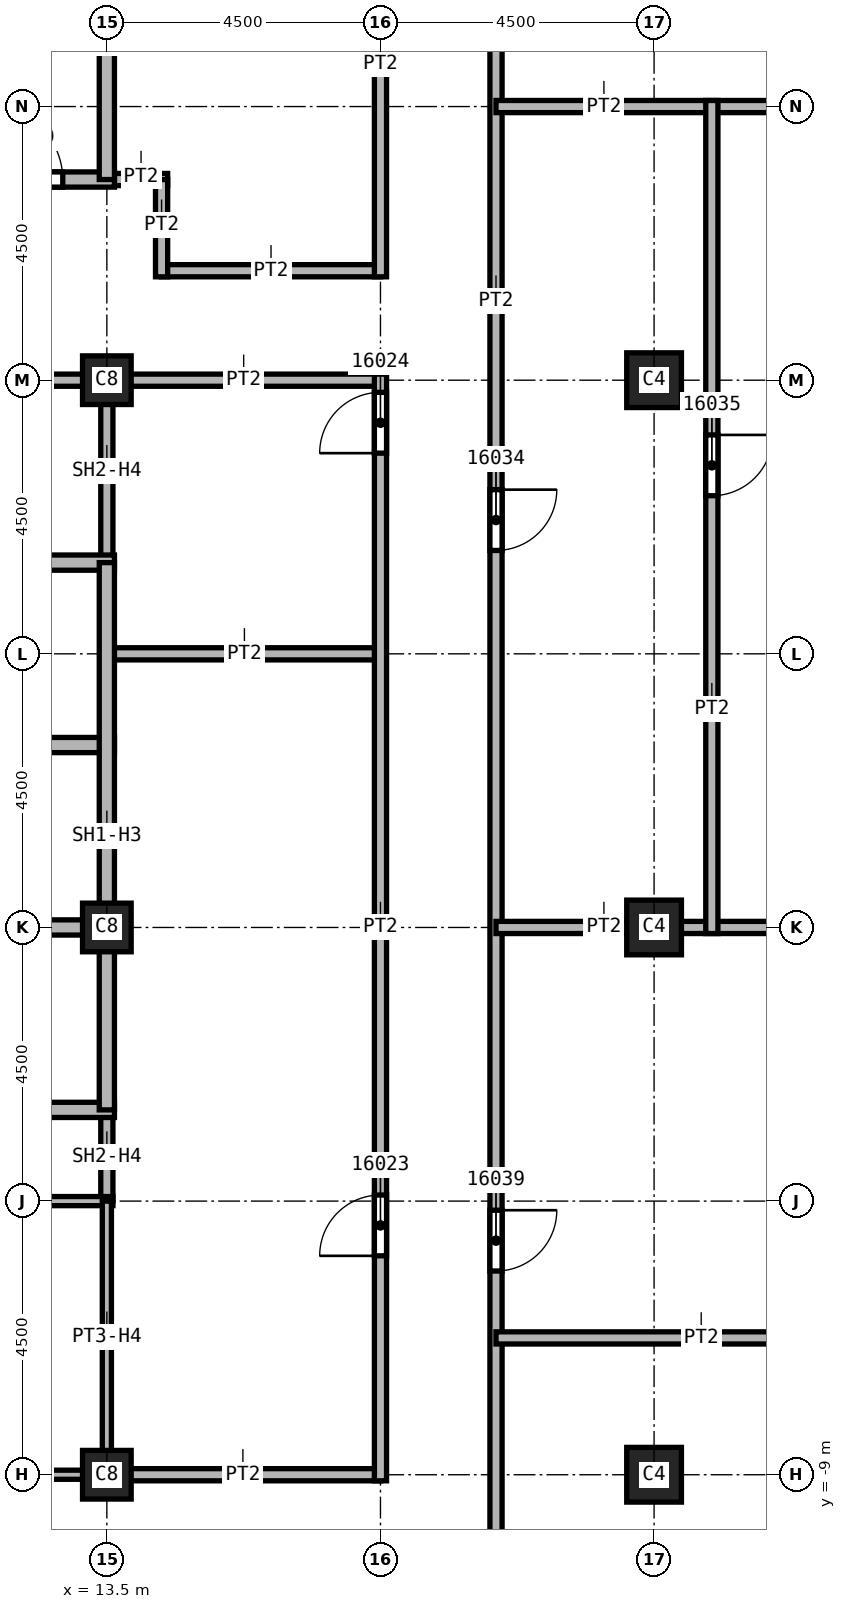
"""IFC4 building model, lengths in metres.
Left out: names, types, materials, properties, quantities, classifications, styles, units other than length and angle.
Written with IfcOpenShell. Run it as: python <this file> out.ifc"""

import sys

from ifc_helpers import new_model, si_unit, direction, frame, frame_2d, origin, origin_2d, place, context, subcontext, project, spatial, rectangle, extrude, element, fill, save


model = new_model("IFC4")
c1 = context("Model", 3, precision=1e-05, world=origin(), true_north=direction((0.0, 1.0)))
c2 = subcontext(c1, "Body", "Model", "MODEL_VIEW")
j1 = project(units=[si_unit("LENGTHUNIT", "METRE"), si_unit("PLANEANGLEUNIT", "RADIAN")], contexts=[c1])
p1 = place(None, origin())
s1 = spatial("IfcSite", under=j1, at=p1, CompositionType="ELEMENT")
p2 = place(p1, origin())
s2 = spatial("IfcBuilding", under=s1, at=p2, CompositionType="ELEMENT")
p3 = place(p2, frame((0.0, 0.0, 246.0)))
s3 = spatial("IfcBuildingStorey", under=s2, at=p3, CompositionType="ELEMENT", Elevation=246.0)
for number, where, z_axis, x_axis in (
    (1, (22.5, 0.0, 0.0), (0.0, 0.0, 1.0), (1.0, 0.0, 0.0)),
    (2, (22.5, 9.0, 0.0), (0.0, 0.0, 1.0), (1.0, 0.0, 0.0)),
    (3, (22.5, -9.0, 0.0), (0.0, 0.0, 1.0), (1.0, 0.0, 0.0)),
):
    element("IfcColumn", number, at=place(p3, frame(where, z_axis=z_axis, x_axis=x_axis)), inside=s3, PredefinedType="COLUMN", context=c2, shape_type="SweptSolid", body=[
        extrude(rectangle(XDim=0.9, YDim=0.9, at=origin_2d()), origin(), (0.0, 0.0, 1.0), 3.72),
    ])
for number, where, z_axis, x_axis in (
    (4, (13.5, 0.0, 0.0), (0.0, 0.0, 1.0), (1.0, 0.0, 0.0)),
    (5, (13.5, 9.0, 0.0), (0.0, 0.0, 1.0), (1.0, 0.0, 0.0)),
    (6, (13.5, -9.0, 0.0), (0.0, 0.0, 1.0), (1.0, 0.0, 0.0)),
):
    element("IfcColumn", number, at=place(p3, frame(where, z_axis=z_axis, x_axis=x_axis)), inside=s3, PredefinedType="COLUMN", context=c2, shape_type="SweptSolid", body=[
        extrude(rectangle(XDim=0.8, YDim=0.8, at=origin_2d()), origin(), (0.0, 0.0, 1.0), 3.72),
    ])
p4 = place(p3, frame((13.375, 12.3, 0.0), z_axis=(0.0, 0.0, 1.0), x_axis=(1.0, 0.0, 0.0)))
e7 = element("IfcWall", 7, at=p4, inside=s3, PredefinedType="PARTITIONING", context=c2, shape_type="SweptSolid", body=[
    extrude(rectangle(XDim=1.125, YDim=0.2, at=frame_2d((0.562, 0.0))), origin(), (0.0, 0.0, 1.0), 3.72),
])
for number, where, z_axis, x_axis in (
    (8, (13.5, -9.0, 0.0), (0.0, 0.0, 1.0), (1.0, 0.0, 0.0)),
    (9, (13.5, 4.5, 0.0), (0.0, 0.0, 1.0), (1.0, 0.0, 0.0)),
    (10, (18.0, 9.0, 0.0), (0.0, 0.0, 1.0), (-1.0, 0.0, 0.0)),
):
    element("IfcWall", number, at=place(p3, frame(where, z_axis=z_axis, x_axis=x_axis)), inside=s3, PredefinedType="PARTITIONING", context=c2, shape_type="SweptSolid", body=[
        extrude(rectangle(XDim=4.5, YDim=0.2, at=frame_2d((2.25, 0.0))), origin(), (0.0, 0.0, 1.0), 3.72),
    ])
p5 = place(p3, frame((14.4, 10.8, 0.0), z_axis=(0.0, 0.0, 1.0), x_axis=(1.0, 0.0, 0.0)))
e11 = element("IfcWall", 11, at=p5, inside=s3, PredefinedType="PARTITIONING", context=c2, shape_type="SweptSolid", body=[
    extrude(rectangle(XDim=3.6, YDim=0.2, at=frame_2d((1.8, 0.0))), origin(), (0.0, 0.0, 1.0), 3.72),
])
p6 = place(p3, frame((14.4, 12.3, 0.0), z_axis=(0.0, 0.0, 1.0), x_axis=(0.0, -1.0, 0.0)))
e12 = element("IfcWall", 12, at=p6, inside=s3, PredefinedType="PARTITIONING", context=c2, shape_type="SweptSolid", body=[
    extrude(rectangle(XDim=1.6, YDim=0.2, at=frame_2d((0.8, 0.0))), origin(), (0.0, 0.0, 1.0), 3.72),
])
p7 = place(p3, frame((18.0, -9.1, 0.0), z_axis=(0.0, 0.0, 1.0), x_axis=(0.0, 1.0, 0.0)))
e13 = element("IfcWall", 13, at=p7, inside=s3, PredefinedType="PARTITIONING", context=c2, shape_type="SweptSolid", body=[
    extrude(rectangle(XDim=18.2, YDim=0.2, at=frame_2d((9.1, 0.0))), origin(), (0.0, 0.0, 1.0), 3.72),
])
p8 = place(p7, frame((3.7, 0.0, 0.0)))
e14 = element("IfcOpeningElement", 14, at=p8, cuts=e13, PredefinedType="OPENING", context=c2, shape_type="SweptSolid", body=[
    extrude(rectangle(XDim=1.0, YDim=2.1, at=frame_2d((0.5, 1.05))), frame((0.0, 0.1, 0.0), z_axis=(0.0, -1.0, 0.0), x_axis=(1.0, 0.0, 0.0)), (0.0, 0.0, 1.0), 0.2),
])
p9 = place(p7, frame((16.9, 0.0, 0.0)))
e15 = element("IfcOpeningElement", 15, at=p9, cuts=e13, PredefinedType="OPENING", context=c2, shape_type="SweptSolid", body=[
    extrude(rectangle(XDim=1.0, YDim=2.1, at=frame_2d((0.5, 1.05))), frame((0.0, 0.1, 0.0), z_axis=(0.0, -1.0, 0.0), x_axis=(1.0, 0.0, 0.0)), (0.0, 0.0, 1.0), 0.2),
])
p10 = place(p3, frame((18.0, 10.7, 0.0), z_axis=(0.0, 0.0, 1.0), x_axis=(0.0, 1.0, 0.0)))
e16 = element("IfcWall", 16, at=p10, inside=s3, PredefinedType="PARTITIONING", context=c2, shape_type="SweptSolid", body=[
    extrude(rectangle(XDim=11.2, YDim=0.2, at=frame_2d((5.6, 0.0))), origin(), (0.0, 0.0, 1.0), 3.72),
])
p11 = place(p10, frame((6.8, 0.0, 0.0)))
e17 = element("IfcOpeningElement", 17, at=p11, cuts=e16, PredefinedType="OPENING", context=c2, shape_type="SweptSolid", body=[
    extrude(rectangle(XDim=1.0, YDim=2.1, at=frame_2d((0.5, 1.05))), frame((0.0, 0.1, 0.0), z_axis=(0.0, -1.0, 0.0), x_axis=(1.0, 0.0, 0.0)), (0.0, 0.0, 1.0), 0.2),
])
p12 = place(p3, frame((19.9, 21.9, 0.0), z_axis=(0.0, 0.0, 1.0), x_axis=(0.0, -1.0, 0.0)))
e18 = element("IfcWall", 18, at=p12, inside=s3, PredefinedType="PARTITIONING", context=c2, shape_type="SweptSolid", body=[
    extrude(rectangle(XDim=43.8, YDim=0.2, at=frame_2d((21.9, 0.0))), origin(), (0.0, 0.0, 1.0), 3.72),
])
p13 = place(p12, frame((14.7, 0.0, 0.0)))
e19 = element("IfcOpeningElement", 19, at=p13, cuts=e18, PredefinedType="OPENING", context=c2, shape_type="SweptSolid", body=[
    extrude(rectangle(XDim=1.0, YDim=2.1, at=frame_2d((0.5, 1.05))), frame((0.0, 0.1, 0.0), z_axis=(0.0, -1.0, 0.0), x_axis=(1.0, 0.0, 0.0)), (0.0, 0.0, 1.0), 0.2),
])
p14 = place(p12, frame((1.9, 0.0, 0.0)))
e20 = element("IfcOpeningElement", 20, at=p14, cuts=e18, PredefinedType="OPENING", context=c2, shape_type="SweptSolid", body=[
    extrude(rectangle(XDim=1.0, YDim=2.1, at=frame_2d((0.5, 1.05))), frame((0.0, 0.1, 0.0), z_axis=(0.0, -1.0, 0.0), x_axis=(1.0, 0.0, 0.0)), (0.0, 0.0, 1.0), 0.2),
])
p15 = place(p12, frame((36.3, 0.0, 0.0)))
e21 = element("IfcOpeningElement", 21, at=p15, cuts=e18, PredefinedType="OPENING", context=c2, shape_type="SweptSolid", body=[
    extrude(rectangle(XDim=1.0, YDim=2.1, at=frame_2d((0.5, 1.05))), frame((0.0, 0.1, 0.0), z_axis=(0.0, -1.0, 0.0), x_axis=(1.0, 0.0, 0.0)), (0.0, 0.0, 1.0), 0.2),
])
p16 = place(p12, frame((34.2, 0.0, 0.0)))
e22 = element("IfcOpeningElement", 22, at=p16, cuts=e18, PredefinedType="OPENING", context=c2, shape_type="SweptSolid", body=[
    extrude(rectangle(XDim=1.0, YDim=2.1, at=frame_2d((0.5, 1.05))), frame((0.0, 0.1, 0.0), z_axis=(0.0, -1.0, 0.0), x_axis=(1.0, 0.0, 0.0)), (0.0, 0.0, 1.0), 0.2),
])
p17 = place(p12, frame((26.55, 0.0, 0.0)))
e23 = element("IfcOpeningElement", 23, at=p17, cuts=e18, PredefinedType="OPENING", context=c2, shape_type="SweptSolid", body=[
    extrude(rectangle(XDim=1.0, YDim=2.1, at=frame_2d((0.5, 1.05))), frame((0.0, 0.1, 0.0), z_axis=(0.0, -1.0, 0.0), x_axis=(1.0, 0.0, 0.0)), (0.0, 0.0, 1.0), 0.2),
])
for number, where, z_axis, x_axis in (
    (24, (19.9, -6.75, 0.0), (0.0, 0.0, 1.0), (1.0, 0.0, 0.0)),
    (25, (19.9, 13.5, 0.0), (0.0, 0.0, 1.0), (1.0, 0.0, 0.0)),
    (26, (26.55, 0.0, 0.0), (0.0, 0.0, 1.0), (-1.0, 0.0, 0.0)),
):
    element("IfcWall", number, at=place(p3, frame(where, z_axis=z_axis, x_axis=x_axis)), inside=s3, PredefinedType="PARTITIONING", context=c2, shape_type="SweptSolid", body=[
        extrude(rectangle(XDim=6.65, YDim=0.2, at=frame_2d((3.325, 0.0))), origin(), (0.0, 0.0, 1.0), 3.72),
    ])
p18 = place(p3, frame((23.45, 13.6, 0.0), z_axis=(0.0, 0.0, 1.0), x_axis=(0.0, -1.0, 0.0)))
e27 = element("IfcWall", 27, at=p18, inside=s3, PredefinedType="PARTITIONING", context=c2, shape_type="SweptSolid", body=[
    extrude(rectangle(XDim=13.7, YDim=0.2, at=frame_2d((6.85, 0.0))), origin(), (0.0, 0.0, 1.0), 3.72),
])
p19 = place(p18, frame((5.5, 0.0, 0.0)))
e28 = element("IfcOpeningElement", 28, at=p19, cuts=e27, PredefinedType="OPENING", context=c2, shape_type="SweptSolid", body=[
    extrude(rectangle(XDim=1.0, YDim=2.1, at=frame_2d((0.5, 1.05))), frame((0.0, 0.1, 0.0), z_axis=(0.0, -1.0, 0.0), x_axis=(1.0, 0.0, 0.0)), (0.0, 0.0, 1.0), 0.2),
])
p20 = place(p3, frame((10.5, 9.0, 0.0), z_axis=(0.0, 0.0, 1.0), x_axis=(1.0, 0.0, 0.0)))
e29 = element("IfcWall", 29, at=p20, inside=s3, PredefinedType="SOLIDWALL", context=c2, shape_type="SweptSolid", body=[
    extrude(rectangle(XDim=3.1, YDim=0.2, at=frame_2d((1.55, 0.0))), origin(), (0.0, 0.0, 1.0), 3.042),
])
p21 = place(p3, frame((13.5, -3.0, 0.0), z_axis=(0.0, 0.0, 1.0), x_axis=(0.0, -1.0, 0.0)))
e30 = element("IfcWall", 30, at=p21, inside=s3, PredefinedType="SOLIDWALL", context=c2, shape_type="SweptSolid", body=[
    extrude(rectangle(XDim=1.5, YDim=0.2, at=frame_2d((0.75, 0.0))), origin(), (0.0, 0.0, 1.0), 3.042),
])
p22 = place(p3, frame((13.5, 9.1, 0.0), z_axis=(0.0, 0.0, 1.0), x_axis=(0.0, -1.0, 0.0)))
e31 = element("IfcWall", 31, at=p22, inside=s3, PredefinedType="SOLIDWALL", context=c2, shape_type="SweptSolid", body=[
    extrude(rectangle(XDim=3.1, YDim=0.2, at=frame_2d((1.55, 0.0))), origin(), (0.0, 0.0, 1.0), 3.042),
])
p23 = place(p3, frame((4.375, -3.0, 0.0), z_axis=(0.0, 0.0, 1.0), x_axis=(1.0, 0.0, 0.0)))
e32 = element("IfcWall", 32, at=p23, inside=s3, PredefinedType="SOLIDWALL", context=c2, shape_type="SweptSolid", body=[
    extrude(rectangle(XDim=9.25, YDim=0.25, at=frame_2d((4.625, 0.0))), origin(), (0.0, 0.0, 1.0), 3.72),
])
p24 = place(p23, frame((3.375, 0.0, 0.0)))
e33 = element("IfcOpeningElement", 33, at=p24, cuts=e32, PredefinedType="OPENING", context=c2, shape_type="SweptSolid", body=[
    extrude(rectangle(XDim=1.1, YDim=2.1, at=frame_2d((0.55, 1.05))), frame((0.0, 0.125, 0.0), z_axis=(0.0, -1.0, 0.0), x_axis=(1.0, 0.0, 0.0)), (0.0, 0.0, 1.0), 0.25),
])
p25 = place(p3, frame((7.5, 3.0, 0.0), z_axis=(0.0, 0.0, 1.0), x_axis=(1.0, 0.0, 0.0)))
e34 = element("IfcWall", 34, at=p25, inside=s3, PredefinedType="SOLIDWALL", context=c2, shape_type="SweptSolid", body=[
    extrude(rectangle(XDim=6.125, YDim=0.25, at=frame_2d((3.062, 0.0))), origin(), (0.0, 0.0, 1.0), 3.72),
])
p26 = place(p25, frame((0.25, 0.0, 0.0)))
e35 = element("IfcOpeningElement", 35, at=p26, cuts=e34, PredefinedType="OPENING", context=c2, shape_type="SweptSolid", body=[
    extrude(rectangle(XDim=1.1, YDim=2.1, at=frame_2d((0.55, 1.05))), frame((0.0, 0.125, 0.0), z_axis=(0.0, -1.0, 0.0), x_axis=(1.0, 0.0, 0.0)), (0.0, 0.0, 1.0), 0.25),
])
for number, where, z_axis, x_axis in (
    (36, (10.5, 0.0, 0.0), (0.0, 0.0, 1.0), (1.0, 0.0, 0.0)),
    (37, (10.5, 6.0, 0.0), (0.0, 0.0, 1.0), (1.0, 0.0, 0.0)),
):
    element("IfcWall", number, at=place(p3, frame(where, z_axis=z_axis, x_axis=x_axis)), inside=s3, PredefinedType="SOLIDWALL", context=c2, shape_type="SweptSolid", body=[
        extrude(rectangle(XDim=3.125, YDim=0.25, at=frame_2d((1.562, 0.0))), origin(), (0.0, 0.0, 1.0), 3.72),
    ])
p27 = place(p3, frame((13.5, 6.0, 0.0), z_axis=(0.0, 0.0, 1.0), x_axis=(0.0, -1.0, 0.0)))
e38 = element("IfcWall", 38, at=p27, inside=s3, PredefinedType="SOLIDWALL", context=c2, shape_type="SweptSolid", body=[
    extrude(rectangle(XDim=9.0, YDim=0.25, at=frame_2d((4.5, 0.0))), origin(), (0.0, 0.0, 1.0), 3.042),
])
p28 = place(p3, frame((4.375, 12.3, 0.0), z_axis=(0.0, 0.0, 1.0), x_axis=(1.0, 0.0, 0.0)))
e39 = element("IfcWall", 39, at=p28, inside=s3, PredefinedType="SOLIDWALL", context=c2, shape_type="SweptSolid", body=[
    extrude(rectangle(XDim=9.25, YDim=0.25, at=frame_2d((4.625, 0.0))), origin(), (0.0, 0.0, 1.0), 3.72),
])
p29 = place(p28, frame((7.2, 0.0, 0.0)))
e40 = element("IfcOpeningElement", 40, at=p29, cuts=e39, PredefinedType="OPENING", context=c2, shape_type="SweptSolid", body=[
    extrude(rectangle(XDim=1.2, YDim=2.1, at=frame_2d((0.6, 1.05))), frame((0.0, 0.125, 0.0), z_axis=(0.0, -1.0, 0.0), x_axis=(1.0, 0.0, 0.0)), (0.0, 0.0, 1.0), 0.25),
])
p30 = place(p3, frame((13.5, 16.8, 0.0), z_axis=(0.0, 0.0, 1.0), x_axis=(0.0, -1.0, 0.0)))
e41 = element("IfcWall", 41, at=p30, inside=s3, PredefinedType="SOLIDWALL", context=c2, shape_type="SweptSolid", body=[
    extrude(rectangle(XDim=4.5, YDim=0.25, at=frame_2d((2.25, 0.0))), origin(), (0.0, 0.0, 1.0), 3.72),
])
p31 = place(p3, frame((10.5, -4.5, 0.0), z_axis=(0.0, 0.0, 1.0), x_axis=(1.0, 0.0, 0.0)))
e42 = element("IfcWall", 42, at=p31, inside=s3, PredefinedType="PARTITIONING", context=c2, shape_type="SweptSolid", body=[
    extrude(rectangle(XDim=3.1, YDim=0.15, at=frame_2d((1.55, 0.0))), origin(), (0.0, 0.0, 1.0), 3.72),
])
p32 = place(p3, frame((13.5, -4.5, 0.0), z_axis=(0.0, 0.0, 1.0), x_axis=(0.0, -1.0, 0.0)))
e43 = element("IfcWall", 43, at=p32, inside=s3, PredefinedType="PARTITIONING", context=c2, shape_type="SweptSolid", body=[
    extrude(rectangle(XDim=4.6, YDim=0.15, at=frame_2d((2.3, 0.0))), origin(), (0.0, 0.0, 1.0), 3.042),
])
p33 = place(p3, frame((13.575, -9.0, 0.0), z_axis=(0.0, 0.0, 1.0), x_axis=(-1.0, 0.0, 0.0)))
e44 = element("IfcWall", 44, at=p33, inside=s3, PredefinedType="PARTITIONING", context=c2, shape_type="SweptSolid", body=[
    extrude(rectangle(XDim=3.075, YDim=0.15, at=frame_2d((1.538, 0.0))), origin(), (0.0, 0.0, 1.0), 3.042),
])
p34 = place(p29, origin())
e45 = element("IfcDoor", 45, at=p34, inside=s3, OperationType="SINGLE_SWING_RIGHT", PredefinedType="DOOR", context=c2, shape_type="SweptSolid", body=[
    extrude(rectangle(XDim=1.2, YDim=2.1, at=frame_2d((0.6, 1.05))), frame((0.0, 0.025, 0.0), z_axis=(0.0, -1.0, 0.0), x_axis=(1.0, 0.0, 0.0)), (0.0, 0.0, 1.0), 0.05),
])
fill(e40, e45)
p35 = place(p8, origin())
e46 = element("IfcDoor", 46, at=p35, inside=s3, OperationType="SINGLE_SWING_RIGHT", PredefinedType="DOOR", context=c2, shape_type="SweptSolid", body=[
    extrude(rectangle(XDim=1.0, YDim=2.1, at=frame_2d((0.5, 1.05))), frame((0.0, 0.025, 0.0), z_axis=(0.0, -1.0, 0.0), x_axis=(1.0, 0.0, 0.0)), (0.0, 0.0, 1.0), 0.05),
])
fill(e14, e46)
p36 = place(p9, origin())
e47 = element("IfcDoor", 47, at=p36, inside=s3, OperationType="SINGLE_SWING_LEFT", PredefinedType="DOOR", context=c2, shape_type="SweptSolid", body=[
    extrude(rectangle(XDim=1.0, YDim=2.1, at=frame_2d((0.5, 1.05))), frame((0.0, 0.025, 0.0), z_axis=(0.0, -1.0, 0.0), x_axis=(1.0, 0.0, 0.0)), (0.0, 0.0, 1.0), 0.05),
])
fill(e15, e47)
p37 = place(p13, origin())
e48 = element("IfcDoor", 48, at=p37, inside=s3, OperationType="SINGLE_SWING_LEFT", PredefinedType="DOOR", context=c2, shape_type="SweptSolid", body=[
    extrude(rectangle(XDim=1.0, YDim=2.1, at=frame_2d((0.5, 1.05))), frame((0.0, 0.025, 0.0), z_axis=(0.0, -1.0, 0.0), x_axis=(1.0, 0.0, 0.0)), (0.0, 0.0, 1.0), 0.05),
])
fill(e19, e48)
p38 = place(p19, origin())
e49 = element("IfcDoor", 49, at=p38, inside=s3, OperationType="SINGLE_SWING_RIGHT", PredefinedType="DOOR", context=c2, shape_type="SweptSolid", body=[
    extrude(rectangle(XDim=1.0, YDim=2.1, at=frame_2d((0.5, 1.05))), frame((0.0, 0.025, 0.0), z_axis=(0.0, -1.0, 0.0), x_axis=(1.0, 0.0, 0.0)), (0.0, 0.0, 1.0), 0.05),
])
fill(e28, e49)
p39 = place(p17, origin())
e50 = element("IfcDoor", 50, at=p39, inside=s3, OperationType="SINGLE_SWING_RIGHT", PredefinedType="DOOR", context=c2, shape_type="SweptSolid", body=[
    extrude(rectangle(XDim=1.0, YDim=2.1, at=frame_2d((0.5, 1.05))), frame((0.0, 0.025, 0.0), z_axis=(0.0, -1.0, 0.0), x_axis=(1.0, 0.0, 0.0)), (0.0, 0.0, 1.0), 0.05),
])
fill(e23, e50)
save(model, sys.argv[1])
